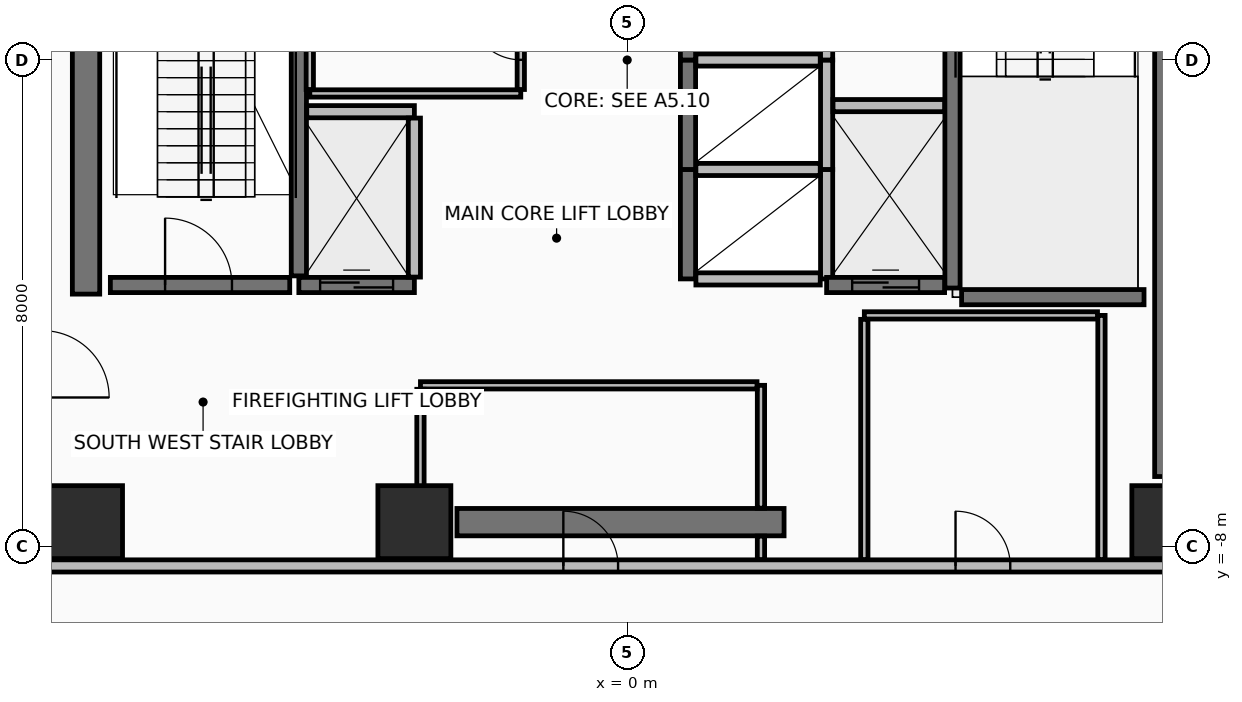
"""IFC4 building model, lengths in metres.
Left out: names, types, materials, properties, quantities, classifications, styles, units other than length and angle.
Written with IfcOpenShell. Run it as: python <this file> out.ifc"""

import sys

from ifc_helpers import new_model, si_unit, direction, frame, frame_2d, origin, origin_2d, place, context, subcontext, project, spatial, rectangle, extrude, element, fill, save


model = new_model("IFC4")
c1 = context("Model", 3, precision=1e-05, world=origin(), true_north=direction((0.0, 1.0)))
c2 = subcontext(c1, "Body", "Model", "MODEL_VIEW")
j1 = project(units=[si_unit("LENGTHUNIT", "METRE"), si_unit("PLANEANGLEUNIT", "RADIAN")], contexts=[c1])
p1 = place(None, origin())
s1 = spatial("IfcSite", under=j1, at=p1, CompositionType="ELEMENT")
p2 = place(p1, origin())
s2 = spatial("IfcBuilding", under=s1, at=p2, CompositionType="ELEMENT")
p3 = place(p2, frame((0.0, 0.0, 214.85)))
s3 = spatial("IfcBuildingStorey", under=s2, at=p3, CompositionType="ELEMENT", Elevation=214.85)
for number, where, z_axis, x_axis in (
    (1, (-8.9, -7.6, 0.0), (0.0, 0.0, 1.0), (1.0, 0.0, 0.0)),
    (2, (-3.5, -7.6, 0.0), (0.0, 0.0, 1.0), (1.0, 0.0, 0.0)),
    (3, (8.9, -7.6, 0.0), (0.0, 0.0, 1.0), (1.0, 0.0, 0.0)),
):
    element("IfcColumn", number, at=place(p3, frame(where, z_axis=z_axis, x_axis=x_axis)), inside=s3, PredefinedType="COLUMN", context=c2, shape_type="SweptSolid", body=[
        extrude(rectangle(XDim=1.2, YDim=1.2, at=origin_2d()), origin(), (0.0, 0.0, 1.0), 3.6),
    ])
p4 = place(p3, frame((-2.8, -7.6, 0.0), z_axis=(0.0, 0.0, 1.0), x_axis=(1.0, 0.0, 0.0)))
e4 = element("IfcWall", 4, at=p4, inside=s3, PredefinedType="SHEAR", context=c2, shape_type="SweptSolid", body=[
    extrude(rectangle(XDim=5.38, YDim=0.45, at=frame_2d((2.69, 0.0))), origin(), (0.0, 0.0, 1.0), 3.42),
])
for number, where, z_axis, x_axis in (
    (5, (-8.9, -3.85, 0.0), (0.0, 0.0, 1.0), (0.0, 1.0, 0.0)),
    (6, (8.9, -6.85, 0.0), (0.0, 0.0, 1.0), (0.0, 1.0, 0.0)),
):
    element("IfcWall", number, at=place(p3, frame(where, z_axis=z_axis, x_axis=x_axis)), inside=s3, PredefinedType="SHEAR", context=c2, shape_type="SweptSolid", body=[
        extrude(rectangle(XDim=10.7, YDim=0.45, at=frame_2d((5.35, 0.0))), origin(), (0.0, 0.0, 1.0), 3.42),
    ])
p5 = place(p3, frame((-9.62, -8.32, 0.0), z_axis=(0.0, 0.0, 1.0), x_axis=(1.0, 0.0, 0.0)))
e7 = element("IfcWall", 7, at=p5, inside=s3, PredefinedType="PARTITIONING", context=c2, shape_type="SweptSolid", body=[
    extrude(rectangle(XDim=19.24, YDim=0.2, at=frame_2d((9.62, 0.0))), origin(), (0.0, 0.0, 1.0), 2.865),
])
p6 = place(p5, frame((8.57, 0.0, 0.0)))
e8 = element("IfcOpeningElement", 8, at=p6, cuts=e7, PredefinedType="OPENING", context=c2, shape_type="SweptSolid", body=[
    extrude(rectangle(XDim=0.9, YDim=2.1, at=frame_2d((0.45, 1.05))), frame((0.0, 0.11, 0.0), z_axis=(0.0, -1.0, 0.0), x_axis=(1.0, 0.0, 0.0)), (0.0, 0.0, 1.0), 0.22),
])
p7 = place(p5, frame((15.02, 0.0, 0.0)))
e9 = element("IfcOpeningElement", 9, at=p7, cuts=e7, PredefinedType="OPENING", context=c2, shape_type="SweptSolid", body=[
    extrude(rectangle(XDim=0.9, YDim=2.1, at=frame_2d((0.45, 1.05))), frame((0.0, 0.11, 0.0), z_axis=(0.0, -1.0, 0.0), x_axis=(1.0, 0.0, 0.0)), (0.0, 0.0, 1.0), 0.22),
])
p8 = place(p3, frame((-5.4, -3.55, 0.0), z_axis=(0.0, 0.0, 1.0), x_axis=(0.0, 1.0, 0.0)))
e10 = element("IfcWall", 10, at=p8, inside=s3, PredefinedType="SHEAR", context=c2, shape_type="SweptSolid", body=[
    extrude(rectangle(XDim=7.3, YDim=0.25, at=frame_2d((3.65, 0.0))), origin(), (0.0, 0.0, 1.0), 3.42),
])
p9 = place(p3, frame((-8.5, -3.7, 0.0), z_axis=(0.0, 0.0, 1.0), x_axis=(1.0, 0.0, 0.0)))
e11 = element("IfcWall", 11, at=p9, inside=s3, PredefinedType="SHEAR", context=c2, shape_type="SweptSolid", body=[
    extrude(rectangle(XDim=2.95, YDim=0.25, at=frame_2d((1.475, 0.0))), origin(), (0.0, 0.0, 1.0), 3.42),
])
p10 = place(p9, frame((0.9, 0.0, 0.0)))
e12 = element("IfcOpeningElement", 12, at=p10, cuts=e11, PredefinedType="OPENING", context=c2, shape_type="SweptSolid", body=[
    extrude(rectangle(XDim=1.1, YDim=2.15, at=frame_2d((0.55, 1.075))), frame((0.0, 0.135, 0.0), z_axis=(0.0, -1.0, 0.0), x_axis=(1.0, 0.0, 0.0)), (0.0, 0.0, 1.0), 0.27),
])
p11 = place(p3, frame((5.35, -3.75, 0.0), z_axis=(0.0, 0.0, 1.0), x_axis=(0.0, 1.0, 0.0)))
e13 = element("IfcWall", 13, at=p11, inside=s3, PredefinedType="SHEAR", context=c2, shape_type="SweptSolid", body=[
    extrude(rectangle(XDim=7.3, YDim=0.25, at=frame_2d((3.65, 0.0))), origin(), (0.0, 0.0, 1.0), 3.42),
])
p12 = place(p3, frame((5.5, -3.9, 0.0), z_axis=(0.0, 0.0, 1.0), x_axis=(1.0, 0.0, 0.0)))
e14 = element("IfcWall", 14, at=p12, inside=s3, PredefinedType="SHEAR", context=c2, shape_type="SweptSolid", body=[
    extrude(rectangle(XDim=3.0, YDim=0.25, at=frame_2d((1.5, 0.0))), origin(), (0.0, 0.0, 1.0), 3.42),
])
p13 = place(p3, frame((1.0, -3.6, 0.0), z_axis=(0.0, 0.0, 1.0), x_axis=(0.0, 1.0, 0.0)))
e15 = element("IfcWall", 15, at=p13, inside=s3, PredefinedType="SHEAR", context=c2, shape_type="SweptSolid", body=[
    extrude(rectangle(XDim=1.8, YDim=0.25, at=frame_2d((0.9, 0.0))), origin(), (0.0, 0.0, 1.0), 3.42),
])
p14 = place(p3, frame((3.28, -3.6, 0.0), z_axis=(0.0, 0.0, 1.0), x_axis=(0.0, 1.0, 0.0)))
e16 = element("IfcWall", 16, at=p14, inside=s3, PredefinedType="PARTITIONING", context=c2, shape_type="SweptSolid", body=[
    extrude(rectangle(XDim=1.8, YDim=0.2, at=frame_2d((0.9, 0.0))), origin(), (0.0, 0.0, 1.0), 3.42),
])
for number, where, z_axis, x_axis in (
    (17, (1.13, -3.6, 0.0), (0.0, 0.0, 1.0), (1.0, 0.0, 0.0)),
    (18, (1.13, -1.8, 0.0), (0.0, 0.0, 1.0), (1.0, 0.0, 0.0)),
):
    element("IfcWall", number, at=place(p3, frame(where, z_axis=z_axis, x_axis=x_axis)), inside=s3, PredefinedType="PARTITIONING", context=c2, shape_type="SweptSolid", body=[
        extrude(rectangle(XDim=2.045, YDim=0.2, at=frame_2d((1.022, 0.0))), origin(), (0.0, 0.0, 1.0), 3.42),
    ])
p15 = place(p3, frame((1.0, -1.8, 0.0), z_axis=(0.0, 0.0, 1.0), x_axis=(0.0, 1.0, 0.0)))
e19 = element("IfcWall", 19, at=p15, inside=s3, PredefinedType="SHEAR", context=c2, shape_type="SweptSolid", body=[
    extrude(rectangle(XDim=1.8, YDim=0.25, at=frame_2d((0.9, 0.0))), origin(), (0.0, 0.0, 1.0), 3.42),
])
p16 = place(p3, frame((3.28, -1.8, 0.0), z_axis=(0.0, 0.0, 1.0), x_axis=(0.0, 1.0, 0.0)))
e20 = element("IfcWall", 20, at=p16, inside=s3, PredefinedType="PARTITIONING", context=c2, shape_type="SweptSolid", body=[
    extrude(rectangle(XDim=1.8, YDim=0.2, at=frame_2d((0.9, 0.0))), origin(), (0.0, 0.0, 1.0), 3.42),
])
p17 = place(p3, frame((1.13, 0.0, 0.0), z_axis=(0.0, 0.0, 1.0), x_axis=(1.0, 0.0, 0.0)))
e21 = element("IfcWall", 21, at=p17, inside=s3, PredefinedType="PARTITIONING", context=c2, shape_type="SweptSolid", body=[
    extrude(rectangle(XDim=2.045, YDim=0.2, at=frame_2d((1.022, 0.0))), origin(), (0.0, 0.0, 1.0), 3.42),
])
p18 = place(p3, frame((1.0, 0.0, 0.0), z_axis=(0.0, 0.0, 1.0), x_axis=(0.0, 1.0, 0.0)))
e22 = element("IfcWall", 22, at=p18, inside=s3, PredefinedType="SHEAR", context=c2, shape_type="SweptSolid", body=[
    extrude(rectangle(XDim=1.8, YDim=0.25, at=frame_2d((0.9, 0.0))), origin(), (0.0, 0.0, 1.0), 3.42),
])
p19 = place(p3, frame((3.28, 0.0, 0.0), z_axis=(0.0, 0.0, 1.0), x_axis=(0.0, 1.0, 0.0)))
e23 = element("IfcWall", 23, at=p19, inside=s3, PredefinedType="PARTITIONING", context=c2, shape_type="SweptSolid", body=[
    extrude(rectangle(XDim=1.8, YDim=0.2, at=frame_2d((0.9, 0.0))), origin(), (0.0, 0.0, 1.0), 3.42),
])
p20 = place(p3, frame((-5.4, -3.7, 0.0), z_axis=(0.0, 0.0, 1.0), x_axis=(1.0, 0.0, 0.0)))
e24 = element("IfcWall", 24, at=p20, inside=s3, PredefinedType="SHEAR", context=c2, shape_type="SweptSolid", body=[
    extrude(rectangle(XDim=1.9, YDim=0.25, at=frame_2d((0.95, 0.0))), origin(), (0.0, 0.0, 1.0), 3.42),
])
p21 = place(p20, frame((0.35, 0.0, 0.0)))
e25 = element("IfcOpeningElement", 25, at=p21, cuts=e24, PredefinedType="OPENING", context=c2, shape_type="SweptSolid", body=[
    extrude(rectangle(XDim=1.2, YDim=2.2, at=frame_2d((0.6, 1.1))), frame((0.0, 0.135, 0.0), z_axis=(0.0, -1.0, 0.0), x_axis=(1.0, 0.0, 0.0)), (0.0, 0.0, 1.0), 0.27),
])
p22 = place(p3, frame((-5.27, -0.85, 0.0), z_axis=(0.0, 0.0, 1.0), x_axis=(1.0, 0.0, 0.0)))
e26 = element("IfcWall", 26, at=p22, inside=s3, PredefinedType="PARTITIONING", context=c2, shape_type="SweptSolid", body=[
    extrude(rectangle(XDim=1.77, YDim=0.2, at=frame_2d((0.885, 0.0))), origin(), (0.0, 0.0, 1.0), 3.42),
])
p23 = place(p3, frame((-3.5, -3.57, 0.0), z_axis=(0.0, 0.0, 1.0), x_axis=(0.0, 1.0, 0.0)))
e27 = element("IfcWall", 27, at=p23, inside=s3, PredefinedType="PARTITIONING", context=c2, shape_type="SweptSolid", body=[
    extrude(rectangle(XDim=2.615, YDim=0.2, at=frame_2d((1.308, 0.0))), origin(), (0.0, 0.0, 1.0), 3.42),
])
p24 = place(p3, frame((3.28, -3.7, 0.0), z_axis=(0.0, 0.0, 1.0), x_axis=(1.0, 0.0, 0.0)))
e28 = element("IfcWall", 28, at=p24, inside=s3, PredefinedType="SHEAR", context=c2, shape_type="SweptSolid", body=[
    extrude(rectangle(XDim=1.94, YDim=0.25, at=frame_2d((0.97, 0.0))), origin(), (0.0, 0.0, 1.0), 3.42),
])
p25 = place(p24, frame((0.42, 0.0, 0.0)))
e29 = element("IfcOpeningElement", 29, at=p25, cuts=e28, PredefinedType="OPENING", context=c2, shape_type="SweptSolid", body=[
    extrude(rectangle(XDim=1.1, YDim=2.2, at=frame_2d((0.55, 1.1))), frame((0.0, 0.135, 0.0), z_axis=(0.0, -1.0, 0.0), x_axis=(1.0, 0.0, 0.0)), (0.0, 0.0, 1.0), 0.27),
])
p26 = place(p3, frame((3.385, -0.75, 0.0), z_axis=(0.0, 0.0, 1.0), x_axis=(1.0, 0.0, 0.0)))
e30 = element("IfcWall", 30, at=p26, inside=s3, PredefinedType="PARTITIONING", context=c2, shape_type="SweptSolid", body=[
    extrude(rectangle(XDim=1.835, YDim=0.2, at=frame_2d((0.917, 0.0))), origin(), (0.0, 0.0, 1.0), 3.42),
])
p27 = place(p3, frame((-5.22, -0.55, 0.0), z_axis=(0.0, 0.0, 1.0), x_axis=(1.0, 0.0, 0.0)))
e31 = element("IfcWall", 31, at=p27, inside=s3, PredefinedType="PARTITIONING", context=c2, shape_type="SweptSolid", body=[
    extrude(rectangle(XDim=3.47, YDim=0.12, at=frame_2d((1.735, 0.0))), origin(), (0.0, 0.0, 1.0), 3.42),
])
p28 = place(p3, frame((-1.75, -0.485, 0.0), z_axis=(0.0, 0.0, 1.0), x_axis=(0.0, 1.0, 0.0)))
e32 = element("IfcWall", 32, at=p28, inside=s3, PredefinedType="PARTITIONING", context=c2, shape_type="SweptSolid", body=[
    extrude(rectangle(XDim=1.825, YDim=0.12, at=frame_2d((0.913, 0.0))), origin(), (0.0, 0.0, 1.0), 3.42),
])
p29 = place(p28, frame((0.488, 0.0, 0.0)))
e33 = element("IfcOpeningElement", 33, at=p29, cuts=e32, PredefinedType="OPENING", context=c2, shape_type="SweptSolid", body=[
    extrude(rectangle(XDim=0.85, YDim=2.1, at=frame_2d((0.425, 1.05))), frame((0.0, 0.07, 0.0), z_axis=(0.0, -1.0, 0.0), x_axis=(1.0, 0.0, 0.0)), (0.0, 0.0, 1.0), 0.14),
])
p30 = place(p3, frame((-5.22, 1.275, 0.0), z_axis=(0.0, 0.0, 1.0), x_axis=(0.0, -1.0, 0.0)))
e34 = element("IfcWall", 34, at=p30, inside=s3, PredefinedType="PARTITIONING", context=c2, shape_type="SweptSolid", body=[
    extrude(rectangle(XDim=1.76, YDim=0.12, at=frame_2d((0.88, 0.0))), origin(), (0.0, 0.0, 1.0), 3.42),
])
p31 = place(p3, frame((2.2, -8.215, 0.0), z_axis=(0.0, 0.0, 1.0), x_axis=(0.0, 1.0, 0.0)))
e35 = element("IfcWall", 35, at=p31, inside=s3, PredefinedType="PARTITIONING", context=c2, shape_type="SweptSolid", body=[
    extrude(rectangle(XDim=0.385, YDim=0.12, at=frame_2d((0.192, 0.0))), origin(), (0.0, 0.0, 1.0), 2.715),
])
p32 = place(p3, frame((2.2, -7.37, 0.0), z_axis=(0.0, 0.0, 1.0), x_axis=(0.0, 1.0, 0.0)))
e36 = element("IfcWall", 36, at=p32, inside=s3, PredefinedType="PARTITIONING", context=c2, shape_type="SweptSolid", body=[
    extrude(rectangle(XDim=2.02, YDim=0.12, at=frame_2d((1.01, 0.0))), origin(), (0.0, 0.0, 1.0), 2.715),
])
p33 = place(p3, frame((2.135, -5.35, 0.0), z_axis=(0.0, 0.0, 1.0), x_axis=(-1.0, 0.0, 0.0)))
e37 = element("IfcWall", 37, at=p33, inside=s3, PredefinedType="PARTITIONING", context=c2, shape_type="SweptSolid", body=[
    extrude(rectangle(XDim=5.535, YDim=0.12, at=frame_2d((2.768, 0.0))), origin(), (0.0, 0.0, 1.0), 2.715),
])
p34 = place(p3, frame((-3.4, -5.415, 0.0), z_axis=(0.0, 0.0, 1.0), x_axis=(0.0, -1.0, 0.0)))
e38 = element("IfcWall", 38, at=p34, inside=s3, PredefinedType="PARTITIONING", context=c2, shape_type="SweptSolid", body=[
    extrude(rectangle(XDim=2.8, YDim=0.12, at=frame_2d((1.4, 0.0))), origin(), (0.0, 0.0, 1.0), 2.715),
])
p35 = place(p3, frame((7.8, -8.215, 0.0), z_axis=(0.0, 0.0, 1.0), x_axis=(0.0, 1.0, 0.0)))
e39 = element("IfcWall", 39, at=p35, inside=s3, PredefinedType="PARTITIONING", context=c2, shape_type="SweptSolid", body=[
    extrude(rectangle(XDim=4.015, YDim=0.12, at=frame_2d((2.008, 0.0))), origin(), (0.0, 0.0, 1.0), 2.715),
])
p36 = place(p3, frame((7.735, -4.2, 0.0), z_axis=(0.0, 0.0, 1.0), x_axis=(-1.0, 0.0, 0.0)))
e40 = element("IfcWall", 40, at=p36, inside=s3, PredefinedType="PARTITIONING", context=c2, shape_type="SweptSolid", body=[
    extrude(rectangle(XDim=3.835, YDim=0.12, at=frame_2d((1.917, 0.0))), origin(), (0.0, 0.0, 1.0), 3.42),
])
p37 = place(p3, frame((3.9, -4.265, 0.0), z_axis=(0.0, 0.0, 1.0), x_axis=(0.0, -1.0, 0.0)))
e41 = element("IfcWall", 41, at=p37, inside=s3, PredefinedType="PARTITIONING", context=c2, shape_type="SweptSolid", body=[
    extrude(rectangle(XDim=3.95, YDim=0.12, at=frame_2d((1.975, 0.0))), origin(), (0.0, 0.0, 1.0), 2.715),
])
p38 = place(p10, origin())
e42 = element("IfcDoor", 42, at=p38, inside=s3, OperationType="SINGLE_SWING_LEFT", PredefinedType="DOOR", context=c2, shape_type="SweptSolid", body=[
    extrude(rectangle(XDim=1.1, YDim=2.15, at=frame_2d((0.55, 1.075))), frame((0.0, 0.025, 0.0), z_axis=(0.0, -1.0, 0.0), x_axis=(1.0, 0.0, 0.0)), (0.0, 0.0, 1.0), 0.05),
])
fill(e12, e42)
p39 = place(p21, origin())
e43 = element("IfcDoor", 43, at=p39, inside=s3, OperationType="SLIDING_TO_RIGHT", PredefinedType="DOOR", context=c2, shape_type="SweptSolid", body=[
    extrude(rectangle(XDim=1.2, YDim=2.2, at=frame_2d((0.6, 1.1))), frame((0.0, 0.025, 0.0), z_axis=(0.0, -1.0, 0.0), x_axis=(1.0, 0.0, 0.0)), (0.0, 0.0, 1.0), 0.05),
])
fill(e25, e43)
p40 = place(p25, origin())
e44 = element("IfcDoor", 44, at=p40, inside=s3, OperationType="SLIDING_TO_LEFT", PredefinedType="DOOR", context=c2, shape_type="SweptSolid", body=[
    extrude(rectangle(XDim=1.1, YDim=2.2, at=frame_2d((0.55, 1.1))), frame((0.0, 0.025, 0.0), z_axis=(0.0, -1.0, 0.0), x_axis=(1.0, 0.0, 0.0)), (0.0, 0.0, 1.0), 0.05),
])
fill(e29, e44)
p41 = place(p29, frame((0.85, 0.0, 0.0), z_axis=(0.0, 0.0, 1.0), x_axis=(-1.0, 0.0, 0.0)))
e45 = element("IfcDoor", 45, at=p41, inside=s3, OperationType="SINGLE_SWING_RIGHT", PredefinedType="DOOR", context=c2, shape_type="SweptSolid", body=[
    extrude(rectangle(XDim=0.85, YDim=2.1, at=frame_2d((0.425, 1.05))), frame((0.0, 0.025, 0.0), z_axis=(0.0, -1.0, 0.0), x_axis=(1.0, 0.0, 0.0)), (0.0, 0.0, 1.0), 0.05),
])
fill(e33, e45)
p42 = place(p6, origin())
e46 = element("IfcDoor", 46, at=p42, inside=s3, OperationType="SINGLE_SWING_LEFT", PredefinedType="DOOR", context=c2, shape_type="SweptSolid", body=[
    extrude(rectangle(XDim=0.9, YDim=2.1, at=frame_2d((0.45, 1.05))), frame((0.0, 0.025, 0.0), z_axis=(0.0, -1.0, 0.0), x_axis=(1.0, 0.0, 0.0)), (0.0, 0.0, 1.0), 0.05),
])
fill(e8, e46)
p43 = place(p7, origin())
e47 = element("IfcDoor", 47, at=p43, inside=s3, OperationType="SINGLE_SWING_LEFT", PredefinedType="DOOR", context=c2, shape_type="SweptSolid", body=[
    extrude(rectangle(XDim=0.9, YDim=2.1, at=frame_2d((0.45, 1.05))), frame((0.0, 0.025, 0.0), z_axis=(0.0, -1.0, 0.0), x_axis=(1.0, 0.0, 0.0)), (0.0, 0.0, 1.0), 0.05),
])
fill(e9, e47)
save(model, sys.argv[1])
